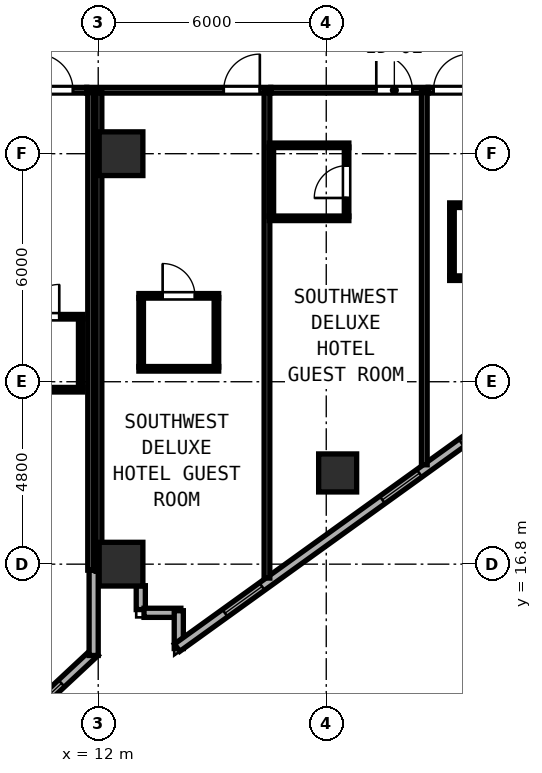
"""IFC4 building model, lengths in metres.
Left out: names, types, materials, properties, quantities, classifications, styles, units other than length and angle.
Written with IfcOpenShell. Run it as: python <this file> out.ifc"""

import sys

from ifc_helpers import new_model, si_unit, direction, frame, frame_2d, origin, origin_2d, place, context, subcontext, project, spatial, rectangle, hollow_rectangle, extrude, element, fill, save


model = new_model("IFC4")
c1 = context("Model", 3, precision=1e-05, world=origin(), true_north=direction((0.0, 1.0)))
c2 = subcontext(c1, "Body", "Model", "MODEL_VIEW")
j1 = project(units=[si_unit("LENGTHUNIT", "METRE"), si_unit("PLANEANGLEUNIT", "RADIAN")], contexts=[c1])
p1 = place(None, origin())
s1 = spatial("IfcSite", under=j1, at=p1, CompositionType="ELEMENT")
p2 = place(p1, origin())
s2 = spatial("IfcBuilding", under=s1, at=p2, CompositionType="ELEMENT")
p3 = place(p2, frame((0.0, 0.0, 62.8)))
s3 = spatial("IfcBuildingStorey", under=s2, at=p3, CompositionType="ELEMENT", Elevation=62.8)
for number, where, z_axis, x_axis in (
    (1, (12.6, 16.8, 0.0), (0.0, 0.0, 1.0), (1.0, 0.0, 0.0)),
    (2, (12.6, 27.6, 0.0), (0.0, 0.0, 1.0), (1.0, 0.0, 0.0)),
):
    element("IfcColumn", number, at=place(p3, frame(where, z_axis=z_axis, x_axis=x_axis)), inside=s3, PredefinedType="COLUMN", context=c2, shape_type="SweptSolid", body=[
        extrude(hollow_rectangle(XDim=1.15, YDim=1.15, WallThickness=0.042, at=origin_2d()), origin(), (0.0, 0.0, 1.0), 3.8),
    ])
p4 = place(p3, frame((18.3, 19.2, 0.0), z_axis=(0.0, 0.0, 1.0), x_axis=(1.0, 0.0, 0.0)))
e3 = element("IfcColumn", 3, at=p4, inside=s3, PredefinedType="COLUMN", context=c2, shape_type="SweptSolid", body=[
    extrude(hollow_rectangle(XDim=1.0, YDim=1.0, WallThickness=0.038, at=origin_2d()), origin(), (0.0, 0.0, 1.0), 3.8),
])
p5 = place(p3, frame((3.27, 6.416, 0.0), z_axis=(0.0, 0.0, 1.0), x_axis=(0.731064187858, 0.682308693505, 0.0)))
e4 = element("IfcWall", 4, at=p5, inside=s3, PredefinedType="SOLIDWALL", context=c2, shape_type="SweptSolid", body=[
    extrude(rectangle(XDim=11.833, YDim=0.24, at=frame_2d((5.916, 0.0))), origin(), (0.0, 0.0, 1.0), 3.6),
])
p6 = place(p5, frame((1.6, 0.0, 0.85)))
e5 = element("IfcOpeningElement", 5, at=p6, cuts=e4, PredefinedType="OPENING", context=c2, shape_type="SweptSolid", body=[
    extrude(rectangle(XDim=1.2, YDim=1.85, at=frame_2d((0.6, 0.925))), frame((0.0, 0.13, 0.0), z_axis=(0.0, -1.0, 0.0), x_axis=(1.0, 0.0, 0.0)), (0.0, 0.0, 1.0), 0.26),
])
p7 = place(p5, frame((6.912, 0.0, 0.85)))
e6 = element("IfcOpeningElement", 6, at=p7, cuts=e4, PredefinedType="OPENING", context=c2, shape_type="SweptSolid", body=[
    extrude(rectangle(XDim=1.2, YDim=1.85, at=frame_2d((0.6, 0.925))), frame((0.0, 0.13, 0.0), z_axis=(0.0, -1.0, 0.0), x_axis=(1.0, 0.0, 0.0)), (0.0, 0.0, 1.0), 0.26),
])
p8 = place(p5, frame((9.421, 0.0, 0.85)))
e7 = element("IfcOpeningElement", 7, at=p8, cuts=e4, PredefinedType="OPENING", context=c2, shape_type="SweptSolid", body=[
    extrude(rectangle(XDim=1.2, YDim=1.85, at=frame_2d((0.6, 0.925))), frame((0.0, 0.13, 0.0), z_axis=(0.0, -1.0, 0.0), x_axis=(1.0, 0.0, 0.0)), (0.0, 0.0, 1.0), 0.26),
])
p9 = place(p3, frame((11.88, 14.397, 0.0), z_axis=(0.0, 0.0, 1.0), x_axis=(0.0, 1.0, 0.0)))
e8 = element("IfcWall", 8, at=p9, inside=s3, PredefinedType="SOLIDWALL", context=c2, shape_type="SweptSolid", body=[
    extrude(rectangle(XDim=2.243, YDim=0.24, at=frame_2d((1.121, 0.0))), origin(), (0.0, 0.0, 1.0), 3.6),
])
p10 = place(p3, frame((13.12, 16.233, 0.0), z_axis=(0.0, 0.0, 1.0), x_axis=(0.0, -1.0, 0.0)))
e9 = element("IfcWall", 9, at=p10, inside=s3, PredefinedType="SOLIDWALL", context=c2, shape_type="SweptSolid", body=[
    extrude(rectangle(XDim=0.628, YDim=0.24, at=frame_2d((0.314, 0.0))), origin(), (0.0, 0.0, 1.0), 3.6),
])
p11 = place(p3, frame((13.205, 15.52, 0.0), z_axis=(0.0, 0.0, 1.0), x_axis=(1.0, 0.0, 0.0)))
e10 = element("IfcWall", 10, at=p11, inside=s3, PredefinedType="SOLIDWALL", context=c2, shape_type="SweptSolid", body=[
    extrude(rectangle(XDim=0.97, YDim=0.24, at=frame_2d((0.485, 0.0))), origin(), (0.0, 0.0, 1.0), 3.6),
])
p12 = place(p3, frame((14.12, 15.575, 0.0), z_axis=(0.0, 0.0, 1.0), x_axis=(0.0, -1.0, 0.0)))
e11 = element("IfcWall", 11, at=p12, inside=s3, PredefinedType="SOLIDWALL", context=c2, shape_type="SweptSolid", body=[
    extrude(rectangle(XDim=0.996, YDim=0.24, at=frame_2d((0.498, 0.0))), origin(), (0.0, 0.0, 1.0), 3.6),
])
p13 = place(p3, frame((14.075, 14.602, 0.0), z_axis=(0.0, 0.0, 1.0), x_axis=(0.811543176492, 0.58429245476, 0.0)))
e12 = element("IfcWall", 12, at=p13, inside=s3, PredefinedType="SOLIDWALL", context=c2, shape_type="SweptSolid", body=[
    extrude(rectangle(XDim=11.531, YDim=0.24, at=frame_2d((5.765, 0.0))), origin(), (0.0, 0.0, 1.0), 3.097),
])
p14 = place(p13, frame((1.554, 0.0, 0.85)))
e13 = element("IfcOpeningElement", 13, at=p14, cuts=e12, PredefinedType="OPENING", context=c2, shape_type="SweptSolid", body=[
    extrude(rectangle(XDim=1.2, YDim=1.85, at=frame_2d((0.6, 0.925))), frame((0.0, 0.13, 0.0), z_axis=(0.0, -1.0, 0.0), x_axis=(1.0, 0.0, 0.0)), (0.0, 0.0, 1.0), 0.26),
])
p15 = place(p13, frame((6.656, 0.0, 0.85)))
e14 = element("IfcOpeningElement", 14, at=p15, cuts=e12, PredefinedType="OPENING", context=c2, shape_type="SweptSolid", body=[
    extrude(rectangle(XDim=1.2, YDim=1.85, at=frame_2d((0.6, 0.925))), frame((0.0, 0.13, 0.0), z_axis=(0.0, -1.0, 0.0), x_axis=(1.0, 0.0, 0.0)), (0.0, 0.0, 1.0), 0.26),
])
p16 = place(p13, frame((9.218, 0.0, 0.85)))
e15 = element("IfcOpeningElement", 15, at=p16, cuts=e12, PredefinedType="OPENING", context=c2, shape_type="SweptSolid", body=[
    extrude(rectangle(XDim=1.2, YDim=1.85, at=frame_2d((0.6, 0.925))), frame((0.0, 0.13, 0.0), z_axis=(0.0, -1.0, 0.0), x_axis=(1.0, 0.0, 0.0)), (0.0, 0.0, 1.0), 0.26),
])
p17 = place(p3, frame((11.7, 29.27, 0.0), z_axis=(0.0, 0.0, 1.0), x_axis=(1.0, 0.0, 0.0)))
e16 = element("IfcWall", 16, at=p17, inside=s3, PredefinedType="PARTITIONING", context=c2, shape_type="SweptSolid", body=[
    extrude(rectangle(XDim=4.84, YDim=0.15, at=frame_2d((2.42, 0.0))), origin(), (0.0, 0.0, 1.0), 3.6),
])
p18 = place(p17, frame((4.552, 0.0, 0.0), z_axis=(0.0, 0.0, 1.0), x_axis=(-1.0, 0.0, 0.0)))
e17 = element("IfcOpeningElement", 17, at=p18, cuts=e16, PredefinedType="OPENING", context=c2, shape_type="SweptSolid", body=[
    extrude(rectangle(XDim=0.95, YDim=2.15, at=frame_2d((0.475, 1.075))), frame((0.0, 0.085, 0.0), z_axis=(0.0, -1.0, 0.0), x_axis=(1.0, 0.0, 0.0)), (0.0, 0.0, 1.0), 0.17),
])
p19 = place(p3, frame((11.8, 16.642, 0.0), z_axis=(0.0, 0.0, 1.0), x_axis=(0.0, 1.0, 0.0)))
e18 = element("IfcWall", 18, at=p19, inside=s3, PredefinedType="PARTITIONING", context=c2, shape_type="SweptSolid", body=[
    extrude(rectangle(XDim=12.568, YDim=0.15, at=frame_2d((6.284, 0.0))), origin(), (0.0, 0.0, 1.0), 3.6),
])
p20 = place(p3, frame((16.44, 16.434, 0.0), z_axis=(0.0, 0.0, 1.0), x_axis=(0.0, 1.0, 0.0)))
e19 = element("IfcWall", 19, at=p20, inside=s3, PredefinedType="PARTITIONING", context=c2, shape_type="SweptSolid", body=[
    extrude(rectangle(XDim=12.776, YDim=0.15, at=frame_2d((6.388, 0.0))), origin(), (0.0, 0.0, 1.0), 3.6),
])
p21 = place(p3, frame((13.07, 23.86, 0.0), z_axis=(0.0, 0.0, 1.0), x_axis=(1.0, 0.0, 0.0)))
e20 = element("IfcWall", 20, at=p21, inside=s3, PredefinedType="PARTITIONING", context=c2, shape_type="SweptSolid", body=[
    extrude(rectangle(XDim=2.1, YDim=0.12, at=frame_2d((1.05, 0.0))), origin(), (0.0, 0.0, 1.0), 3.6),
])
p22 = place(p21, frame((1.475, 0.0, 0.0), z_axis=(0.0, 0.0, 1.0), x_axis=(-1.0, 0.0, 0.0)))
e21 = element("IfcOpeningElement", 21, at=p22, cuts=e20, PredefinedType="OPENING", context=c2, shape_type="SweptSolid", body=[
    extrude(rectangle(XDim=0.85, YDim=2.1, at=frame_2d((0.425, 1.05))), frame((0.0, 0.07, 0.0), z_axis=(0.0, -1.0, 0.0), x_axis=(1.0, 0.0, 0.0)), (0.0, 0.0, 1.0), 0.14),
])
p23 = place(p3, frame((13.07, 21.94, 0.0), z_axis=(0.0, 0.0, 1.0), x_axis=(1.0, 0.0, 0.0)))
e22 = element("IfcWall", 22, at=p23, inside=s3, PredefinedType="PARTITIONING", context=c2, shape_type="SweptSolid", body=[
    extrude(rectangle(XDim=2.1, YDim=0.12, at=frame_2d((1.05, 0.0))), origin(), (0.0, 0.0, 1.0), 3.6),
])
for number, where, z_axis, x_axis in (
    (23, (13.13, 21.985, 0.0), (0.0, 0.0, 1.0), (0.0, 1.0, 0.0)),
    (24, (15.11, 21.985, 0.0), (0.0, 0.0, 1.0), (0.0, 1.0, 0.0)),
):
    element("IfcWall", number, at=place(p3, frame(where, z_axis=z_axis, x_axis=x_axis)), inside=s3, PredefinedType="PARTITIONING", context=c2, shape_type="SweptSolid", body=[
        extrude(rectangle(XDim=1.83, YDim=0.12, at=frame_2d((0.915, 0.0))), origin(), (0.0, 0.0, 1.0), 3.6),
    ])
p24 = place(p3, frame((16.542, 29.27, 0.0), z_axis=(0.0, 0.0, 1.0), x_axis=(1.0, 0.0, 0.0)))
e25 = element("IfcWall", 25, at=p24, inside=s3, PredefinedType="PARTITIONING", context=c2, shape_type="SweptSolid", body=[
    extrude(rectangle(XDim=4.138, YDim=0.15, at=frame_2d((2.069, 0.0))), origin(), (0.0, 0.0, 1.0), 3.6),
])
p25 = place(p24, frame((3.725, 0.0, 0.0), z_axis=(0.0, 0.0, 1.0), x_axis=(-1.0, 0.0, 0.0)))
e26 = element("IfcOpeningElement", 26, at=p25, cuts=e25, PredefinedType="OPENING", context=c2, shape_type="SweptSolid", body=[
    extrude(rectangle(XDim=0.95, YDim=2.15, at=frame_2d((0.475, 1.075))), frame((0.0, 0.085, 0.0), z_axis=(0.0, -1.0, 0.0), x_axis=(1.0, 0.0, 0.0)), (0.0, 0.0, 1.0), 0.17),
])
p26 = place(p3, frame((20.58, 19.415, 0.0), z_axis=(0.0, 0.0, 1.0), x_axis=(0.0, 1.0, 0.0)))
e27 = element("IfcWall", 27, at=p26, inside=s3, PredefinedType="PARTITIONING", context=c2, shape_type="SweptSolid", body=[
    extrude(rectangle(XDim=9.795, YDim=0.15, at=frame_2d((4.897, 0.0))), origin(), (0.0, 0.0, 1.0), 3.6),
])
p27 = place(p3, frame((16.5, 27.82, 0.0), z_axis=(0.0, 0.0, 1.0), x_axis=(1.0, 0.0, 0.0)))
e28 = element("IfcWall", 28, at=p27, inside=s3, PredefinedType="PARTITIONING", context=c2, shape_type="SweptSolid", body=[
    extrude(rectangle(XDim=2.095, YDim=0.12, at=frame_2d((1.047, 0.0))), origin(), (0.0, 0.0, 1.0), 3.097),
])
p28 = place(p3, frame((16.5, 25.9, 0.0), z_axis=(0.0, 0.0, 1.0), x_axis=(1.0, 0.0, 0.0)))
e29 = element("IfcWall", 29, at=p28, inside=s3, PredefinedType="PARTITIONING", context=c2, shape_type="SweptSolid", body=[
    extrude(rectangle(XDim=2.095, YDim=0.12, at=frame_2d((1.047, 0.0))), origin(), (0.0, 0.0, 1.0), 3.6),
])
p29 = place(p3, frame((16.555, 25.945, 0.0), z_axis=(0.0, 0.0, 1.0), x_axis=(0.0, 1.0, 0.0)))
e30 = element("IfcWall", 30, at=p29, inside=s3, PredefinedType="PARTITIONING", context=c2, shape_type="SweptSolid", body=[
    extrude(rectangle(XDim=1.83, YDim=0.12, at=frame_2d((0.915, 0.0))), origin(), (0.0, 0.0, 1.0), 3.6),
])
p30 = place(p3, frame((18.535, 25.945, 0.0), z_axis=(0.0, 0.0, 1.0), x_axis=(0.0, 1.0, 0.0)))
e31 = element("IfcWall", 31, at=p30, inside=s3, PredefinedType="PARTITIONING", context=c2, shape_type="SweptSolid", body=[
    extrude(rectangle(XDim=1.83, YDim=0.12, at=frame_2d((0.915, 0.0))), origin(), (0.0, 0.0, 1.0), 3.6),
])
p31 = place(p30, frame((0.49, 0.0, 0.0)))
e32 = element("IfcOpeningElement", 32, at=p31, cuts=e31, PredefinedType="OPENING", context=c2, shape_type="SweptSolid", body=[
    extrude(rectangle(XDim=0.85, YDim=2.1, at=frame_2d((0.425, 1.05))), frame((0.0, 0.07, 0.0), z_axis=(0.0, -1.0, 0.0), x_axis=(1.0, 0.0, 0.0)), (0.0, 0.0, 1.0), 0.14),
])
p32 = place(p3, frame((20.682, 29.27, 0.0), z_axis=(0.0, 0.0, 1.0), x_axis=(1.0, 0.0, 0.0)))
e33 = element("IfcWall", 33, at=p32, inside=s3, PredefinedType="PARTITIONING", context=c2, shape_type="SweptSolid", body=[
    extrude(rectangle(XDim=3.236, YDim=0.15, at=frame_2d((1.618, 0.0))), origin(), (0.0, 0.0, 1.0), 3.6),
])
p33 = place(p32, frame((1.09, 0.0, 0.0), z_axis=(0.0, 0.0, 1.0), x_axis=(-1.0, 0.0, 0.0)))
e34 = element("IfcOpeningElement", 34, at=p33, cuts=e33, PredefinedType="OPENING", context=c2, shape_type="SweptSolid", body=[
    extrude(rectangle(XDim=0.95, YDim=2.15, at=frame_2d((0.475, 1.075))), frame((0.0, 0.085, 0.0), z_axis=(0.0, -1.0, 0.0), x_axis=(1.0, 0.0, 0.0)), (0.0, 0.0, 1.0), 0.17),
])
p34 = place(p3, frame((21.248, 26.245, 0.0), z_axis=(0.0, 0.0, 1.0), x_axis=(1.0, 0.0, 0.0)))
e35 = element("IfcWall", 35, at=p34, inside=s3, PredefinedType="PARTITIONING", context=c2, shape_type="SweptSolid", body=[
    extrude(rectangle(XDim=2.1, YDim=0.12, at=frame_2d((1.05, 0.0))), origin(), (0.0, 0.0, 1.0), 3.6),
])
p35 = place(p34, frame((1.475, 0.0, 0.0), z_axis=(0.0, 0.0, 1.0), x_axis=(-1.0, 0.0, 0.0)))
e36 = element("IfcOpeningElement", 36, at=p35, cuts=e35, PredefinedType="OPENING", context=c2, shape_type="SweptSolid", body=[
    extrude(rectangle(XDim=0.85, YDim=2.1, at=frame_2d((0.425, 1.05))), frame((0.0, 0.07, 0.0), z_axis=(0.0, -1.0, 0.0), x_axis=(1.0, 0.0, 0.0)), (0.0, 0.0, 1.0), 0.14),
])
p36 = place(p3, frame((21.248, 24.325, 0.0), z_axis=(0.0, 0.0, 1.0), x_axis=(1.0, 0.0, 0.0)))
e37 = element("IfcWall", 37, at=p36, inside=s3, PredefinedType="PARTITIONING", context=c2, shape_type="SweptSolid", body=[
    extrude(rectangle(XDim=2.1, YDim=0.12, at=frame_2d((1.05, 0.0))), origin(), (0.0, 0.0, 1.0), 3.6),
])
p37 = place(p3, frame((21.308, 24.37, 0.0), z_axis=(0.0, 0.0, 1.0), x_axis=(0.0, 1.0, 0.0)))
e38 = element("IfcWall", 38, at=p37, inside=s3, PredefinedType="PARTITIONING", context=c2, shape_type="SweptSolid", body=[
    extrude(rectangle(XDim=1.83, YDim=0.12, at=frame_2d((0.915, 0.0))), origin(), (0.0, 0.0, 1.0), 3.6),
])
p38 = place(p3, frame((9.402, 29.27, 0.0), z_axis=(0.0, 0.0, 1.0), x_axis=(1.0, 0.0, 0.0)))
e39 = element("IfcWall", 39, at=p38, inside=s3, PredefinedType="PARTITIONING", context=c2, shape_type="SweptSolid", body=[
    extrude(rectangle(XDim=2.296, YDim=0.15, at=frame_2d((1.148, 0.0))), origin(), (0.0, 0.0, 1.0), 3.6),
])
p39 = place(p38, frame((1.934, 0.0, 0.0), z_axis=(0.0, 0.0, 1.0), x_axis=(-1.0, 0.0, 0.0)))
e40 = element("IfcOpeningElement", 40, at=p39, cuts=e39, PredefinedType="OPENING", context=c2, shape_type="SweptSolid", body=[
    extrude(rectangle(XDim=0.95, YDim=2.15, at=frame_2d((0.475, 1.075))), frame((0.0, 0.085, 0.0), z_axis=(0.0, -1.0, 0.0), x_axis=(1.0, 0.0, 0.0)), (0.0, 0.0, 1.0), 0.17),
])
p40 = place(p3, frame((12.02, 16.612, 0.0), z_axis=(0.0, 0.0, 1.0), x_axis=(0.0, 1.0, 0.0)))
e41 = element("IfcWall", 41, at=p40, inside=s3, PredefinedType="PARTITIONING", context=c2, shape_type="SweptSolid", body=[
    extrude(rectangle(XDim=12.598, YDim=0.15, at=frame_2d((6.299, 0.0))), origin(), (0.0, 0.0, 1.0), 3.6),
])
p41 = place(p3, frame((9.5, 23.31, 0.0), z_axis=(0.0, 0.0, 1.0), x_axis=(1.0, 0.0, 0.0)))
e42 = element("IfcWall", 42, at=p41, inside=s3, PredefinedType="PARTITIONING", context=c2, shape_type="SweptSolid", body=[
    extrude(rectangle(XDim=2.1, YDim=0.12, at=frame_2d((1.05, 0.0))), origin(), (0.0, 0.0, 1.0), 3.6),
])
p42 = place(p41, frame((1.475, 0.0, 0.0), z_axis=(0.0, 0.0, 1.0), x_axis=(-1.0, 0.0, 0.0)))
e43 = element("IfcOpeningElement", 43, at=p42, cuts=e42, PredefinedType="OPENING", context=c2, shape_type="SweptSolid", body=[
    extrude(rectangle(XDim=0.85, YDim=2.1, at=frame_2d((0.425, 1.05))), frame((0.0, 0.07, 0.0), z_axis=(0.0, -1.0, 0.0), x_axis=(1.0, 0.0, 0.0)), (0.0, 0.0, 1.0), 0.14),
])
p43 = place(p3, frame((9.5, 21.39, 0.0), z_axis=(0.0, 0.0, 1.0), x_axis=(1.0, 0.0, 0.0)))
e44 = element("IfcWall", 44, at=p43, inside=s3, PredefinedType="PARTITIONING", context=c2, shape_type="SweptSolid", body=[
    extrude(rectangle(XDim=2.1, YDim=0.12, at=frame_2d((1.05, 0.0))), origin(), (0.0, 0.0, 1.0), 3.6),
])
p44 = place(p3, frame((11.54, 21.435, 0.0), z_axis=(0.0, 0.0, 1.0), x_axis=(0.0, 1.0, 0.0)))
e45 = element("IfcWall", 45, at=p44, inside=s3, PredefinedType="PARTITIONING", context=c2, shape_type="SweptSolid", body=[
    extrude(rectangle(XDim=1.83, YDim=0.12, at=frame_2d((0.915, 0.0))), origin(), (0.0, 0.0, 1.0), 3.6),
])
p45 = place(p14, origin())
e46 = element("IfcWindow", 46, at=p45, inside=s3, PartitioningType="SINGLE_PANEL", PredefinedType="WINDOW", context=c2, shape_type="SweptSolid", body=[
    extrude(rectangle(XDim=1.2, YDim=1.85, at=frame_2d((0.6, 0.925))), frame((0.0, 0.03, 0.0), z_axis=(0.0, -1.0, 0.0), x_axis=(1.0, 0.0, 0.0)), (0.0, 0.0, 1.0), 0.06),
])
fill(e13, e46)
p46 = place(p15, origin())
e47 = element("IfcWindow", 47, at=p46, inside=s3, PartitioningType="SINGLE_PANEL", PredefinedType="WINDOW", context=c2, shape_type="SweptSolid", body=[
    extrude(rectangle(XDim=1.2, YDim=1.85, at=frame_2d((0.6, 0.925))), frame((0.0, 0.03, 0.0), z_axis=(0.0, -1.0, 0.0), x_axis=(1.0, 0.0, 0.0)), (0.0, 0.0, 1.0), 0.06),
])
fill(e14, e47)
p47 = place(p18, origin())
e48 = element("IfcDoor", 48, at=p47, inside=s3, OperationType="SINGLE_SWING_LEFT", PredefinedType="DOOR", context=c2, shape_type="SweptSolid", body=[
    extrude(rectangle(XDim=0.95, YDim=2.15, at=frame_2d((0.475, 1.075))), frame((0.0, 0.025, 0.0), z_axis=(0.0, -1.0, 0.0), x_axis=(1.0, 0.0, 0.0)), (0.0, 0.0, 1.0), 0.05),
])
fill(e17, e48)
p48 = place(p22, origin())
e49 = element("IfcDoor", 49, at=p48, inside=s3, OperationType="SINGLE_SWING_RIGHT", PredefinedType="DOOR", context=c2, shape_type="SweptSolid", body=[
    extrude(rectangle(XDim=0.85, YDim=2.1, at=frame_2d((0.425, 1.05))), frame((0.0, 0.025, 0.0), z_axis=(0.0, -1.0, 0.0), x_axis=(1.0, 0.0, 0.0)), (0.0, 0.0, 1.0), 0.05),
])
fill(e21, e49)
p49 = place(p25, origin())
e50 = element("IfcDoor", 50, at=p49, inside=s3, OperationType="SINGLE_SWING_RIGHT", PredefinedType="DOOR", context=c2, shape_type="SweptSolid", body=[
    extrude(rectangle(XDim=0.95, YDim=2.15, at=frame_2d((0.475, 1.075))), frame((0.0, 0.025, 0.0), z_axis=(0.0, -1.0, 0.0), x_axis=(1.0, 0.0, 0.0)), (0.0, 0.0, 1.0), 0.05),
])
fill(e26, e50)
p50 = place(p31, origin())
e51 = element("IfcDoor", 51, at=p50, inside=s3, OperationType="SINGLE_SWING_LEFT", PredefinedType="DOOR", context=c2, shape_type="SweptSolid", body=[
    extrude(rectangle(XDim=0.85, YDim=2.1, at=frame_2d((0.425, 1.05))), frame((0.0, 0.025, 0.0), z_axis=(0.0, -1.0, 0.0), x_axis=(1.0, 0.0, 0.0)), (0.0, 0.0, 1.0), 0.05),
])
fill(e32, e51)
p51 = place(p33, origin())
e52 = element("IfcDoor", 52, at=p51, inside=s3, OperationType="SINGLE_SWING_LEFT", PredefinedType="DOOR", context=c2, shape_type="SweptSolid", body=[
    extrude(rectangle(XDim=0.95, YDim=2.15, at=frame_2d((0.475, 1.075))), frame((0.0, 0.025, 0.0), z_axis=(0.0, -1.0, 0.0), x_axis=(1.0, 0.0, 0.0)), (0.0, 0.0, 1.0), 0.05),
])
fill(e34, e52)
p52 = place(p39, origin())
e53 = element("IfcDoor", 53, at=p52, inside=s3, OperationType="SINGLE_SWING_RIGHT", PredefinedType="DOOR", context=c2, shape_type="SweptSolid", body=[
    extrude(rectangle(XDim=0.95, YDim=2.15, at=frame_2d((0.475, 1.075))), frame((0.0, 0.025, 0.0), z_axis=(0.0, -1.0, 0.0), x_axis=(1.0, 0.0, 0.0)), (0.0, 0.0, 1.0), 0.05),
])
fill(e40, e53)
p53 = place(p42, origin())
e54 = element("IfcDoor", 54, at=p53, inside=s3, OperationType="SINGLE_SWING_LEFT", PredefinedType="DOOR", context=c2, shape_type="SweptSolid", body=[
    extrude(rectangle(XDim=0.85, YDim=2.1, at=frame_2d((0.425, 1.05))), frame((0.0, 0.025, 0.0), z_axis=(0.0, -1.0, 0.0), x_axis=(1.0, 0.0, 0.0)), (0.0, 0.0, 1.0), 0.05),
])
fill(e43, e54)
p54 = place(p16, origin())
e55 = element("IfcWindow", 55, at=p54, inside=s3, PartitioningType="SINGLE_PANEL", PredefinedType="WINDOW", context=c2, shape_type="SweptSolid", body=[
    extrude(rectangle(XDim=1.2, YDim=1.85, at=frame_2d((0.6, 0.925))), frame((0.0, 0.03, 0.0), z_axis=(0.0, -1.0, 0.0), x_axis=(1.0, 0.0, 0.0)), (0.0, 0.0, 1.0), 0.06),
])
fill(e15, e55)
p55 = place(p8, origin())
e56 = element("IfcWindow", 56, at=p55, inside=s3, PartitioningType="SINGLE_PANEL", PredefinedType="WINDOW", context=c2, shape_type="SweptSolid", body=[
    extrude(rectangle(XDim=1.2, YDim=1.85, at=frame_2d((0.6, 0.925))), frame((0.0, 0.03, 0.0), z_axis=(0.0, -1.0, 0.0), x_axis=(1.0, 0.0, 0.0)), (0.0, 0.0, 1.0), 0.06),
])
fill(e7, e56)
save(model, sys.argv[1])
